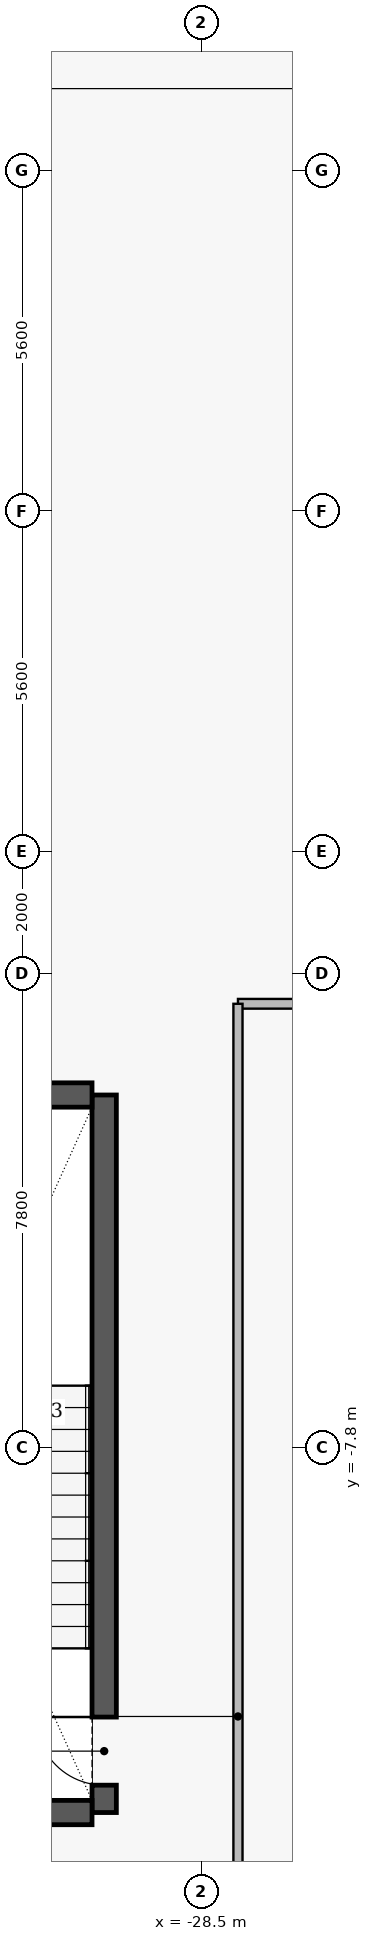
"""IFC4 building model, lengths in metres.
Left out: names, types, materials, properties, quantities, classifications, styles, units other than length and angle.
Written with IfcOpenShell. Run it as: python <this file> out.ifc"""

import sys

from ifc_helpers import new_model, si_unit, direction, frame, frame_2d, origin, place, context, subcontext, project, spatial, rectangle, extrude, element, fill, save


model = new_model("IFC4")
c1 = context("Model", 3, precision=1e-05, world=origin(), true_north=direction((0.0, 1.0)))
c2 = subcontext(c1, "Body", "Model", "MODEL_VIEW")
j1 = project(units=[si_unit("LENGTHUNIT", "METRE"), si_unit("PLANEANGLEUNIT", "RADIAN")], contexts=[c1])
p1 = place(None, origin())
s1 = spatial("IfcSite", under=j1, at=p1, CompositionType="ELEMENT")
p2 = place(p1, origin())
s2 = spatial("IfcBuilding", under=s1, at=p2, CompositionType="ELEMENT")
p3 = place(p2, frame((0.0, 0.0, 18.0)))
s3 = spatial("IfcBuildingStorey", under=s2, at=p3, CompositionType="ELEMENT", Elevation=18.0)
p4 = place(p3, frame((-30.1, -13.8, 0.0), z_axis=(0.0, 0.0, 1.0), x_axis=(0.0, 1.0, 0.0)))
e1 = element("IfcWall", 1, at=p4, inside=s3, PredefinedType="SHEAR", context=c2, shape_type="SweptSolid", body=[
    extrude(rectangle(XDim=11.8, YDim=0.4, at=frame_2d((5.9, 0.0))), origin(), (0.0, 0.0, 1.0), 4.61),
])
p5 = place(p4, frame((0.45, 0.0, 0.0)))
e2 = element("IfcOpeningElement", 2, at=p5, cuts=e1, PredefinedType="OPENING", context=c2, shape_type="SweptSolid", body=[
    extrude(rectangle(XDim=1.12, YDim=2.22, at=frame_2d((0.56, 1.11))), frame((0.0, 0.21, 0.0), z_axis=(0.0, -1.0, 0.0), x_axis=(1.0, 0.0, 0.0)), (0.0, 0.0, 1.0), 0.42),
])
for number, where, z_axis, x_axis in (
    (3, (-35.65, -13.8, 0.0), (0.0, 0.0, 1.0), (1.0, 0.0, 0.0)),
    (4, (-35.65, -2.0, 0.0), (0.0, 0.0, 1.0), (1.0, 0.0, 0.0)),
):
    element("IfcWall", number, at=place(p3, frame(where, z_axis=z_axis, x_axis=x_axis)), inside=s3, PredefinedType="SHEAR", context=c2, shape_type="SweptSolid", body=[
        extrude(rectangle(XDim=5.35, YDim=0.4, at=frame_2d((2.675, 0.0))), origin(), (0.0, 0.0, 1.0), 4.61),
    ])
p6 = place(p3, frame((-27.9, -0.5, 0.0), z_axis=(0.0, 0.0, 1.0), x_axis=(1.0, 0.0, 0.0)))
e5 = element("IfcWall", 5, at=p6, inside=s3, PredefinedType="PARTITIONING", context=c2, shape_type="SweptSolid", body=[
    extrude(rectangle(XDim=13.6, YDim=0.16, at=frame_2d((6.8, 0.0))), origin(), (0.0, 0.0, 1.0), 4.54),
])
p7 = place(p6, frame((7.01, 0.0, 0.0)))
e6 = element("IfcOpeningElement", 6, at=p7, cuts=e5, PredefinedType="OPENING", context=c2, shape_type="SweptSolid", body=[
    extrude(rectangle(XDim=1.08, YDim=2.18, at=frame_2d((0.54, 1.09))), frame((0.0, 0.09, 0.0), z_axis=(0.0, -1.0, 0.0), x_axis=(1.0, 0.0, 0.0)), (0.0, 0.0, 1.0), 0.18),
])
p8 = place(p3, frame((-27.9, -23.94, 0.0), z_axis=(0.0, 0.0, 1.0), x_axis=(0.0, 1.0, 0.0)))
e7 = element("IfcWall", 7, at=p8, inside=s3, PredefinedType="PARTITIONING", context=c2, shape_type="SweptSolid", body=[
    extrude(rectangle(XDim=23.44, YDim=0.15, at=frame_2d((11.72, 0.0))), origin(), (0.0, 0.0, 1.0), 4.54),
])
p9 = place(p5, origin())
e8 = element("IfcDoor", 8, at=p9, inside=s3, OperationType="SINGLE_SWING_RIGHT", PredefinedType="DOOR", context=c2, shape_type="SweptSolid", body=[
    extrude(rectangle(XDim=1.12, YDim=2.22, at=frame_2d((0.56, 1.11))), frame((0.0, 0.025, 0.0), z_axis=(0.0, -1.0, 0.0), x_axis=(1.0, 0.0, 0.0)), (0.0, 0.0, 1.0), 0.05),
])
fill(e2, e8)
save(model, sys.argv[1])
